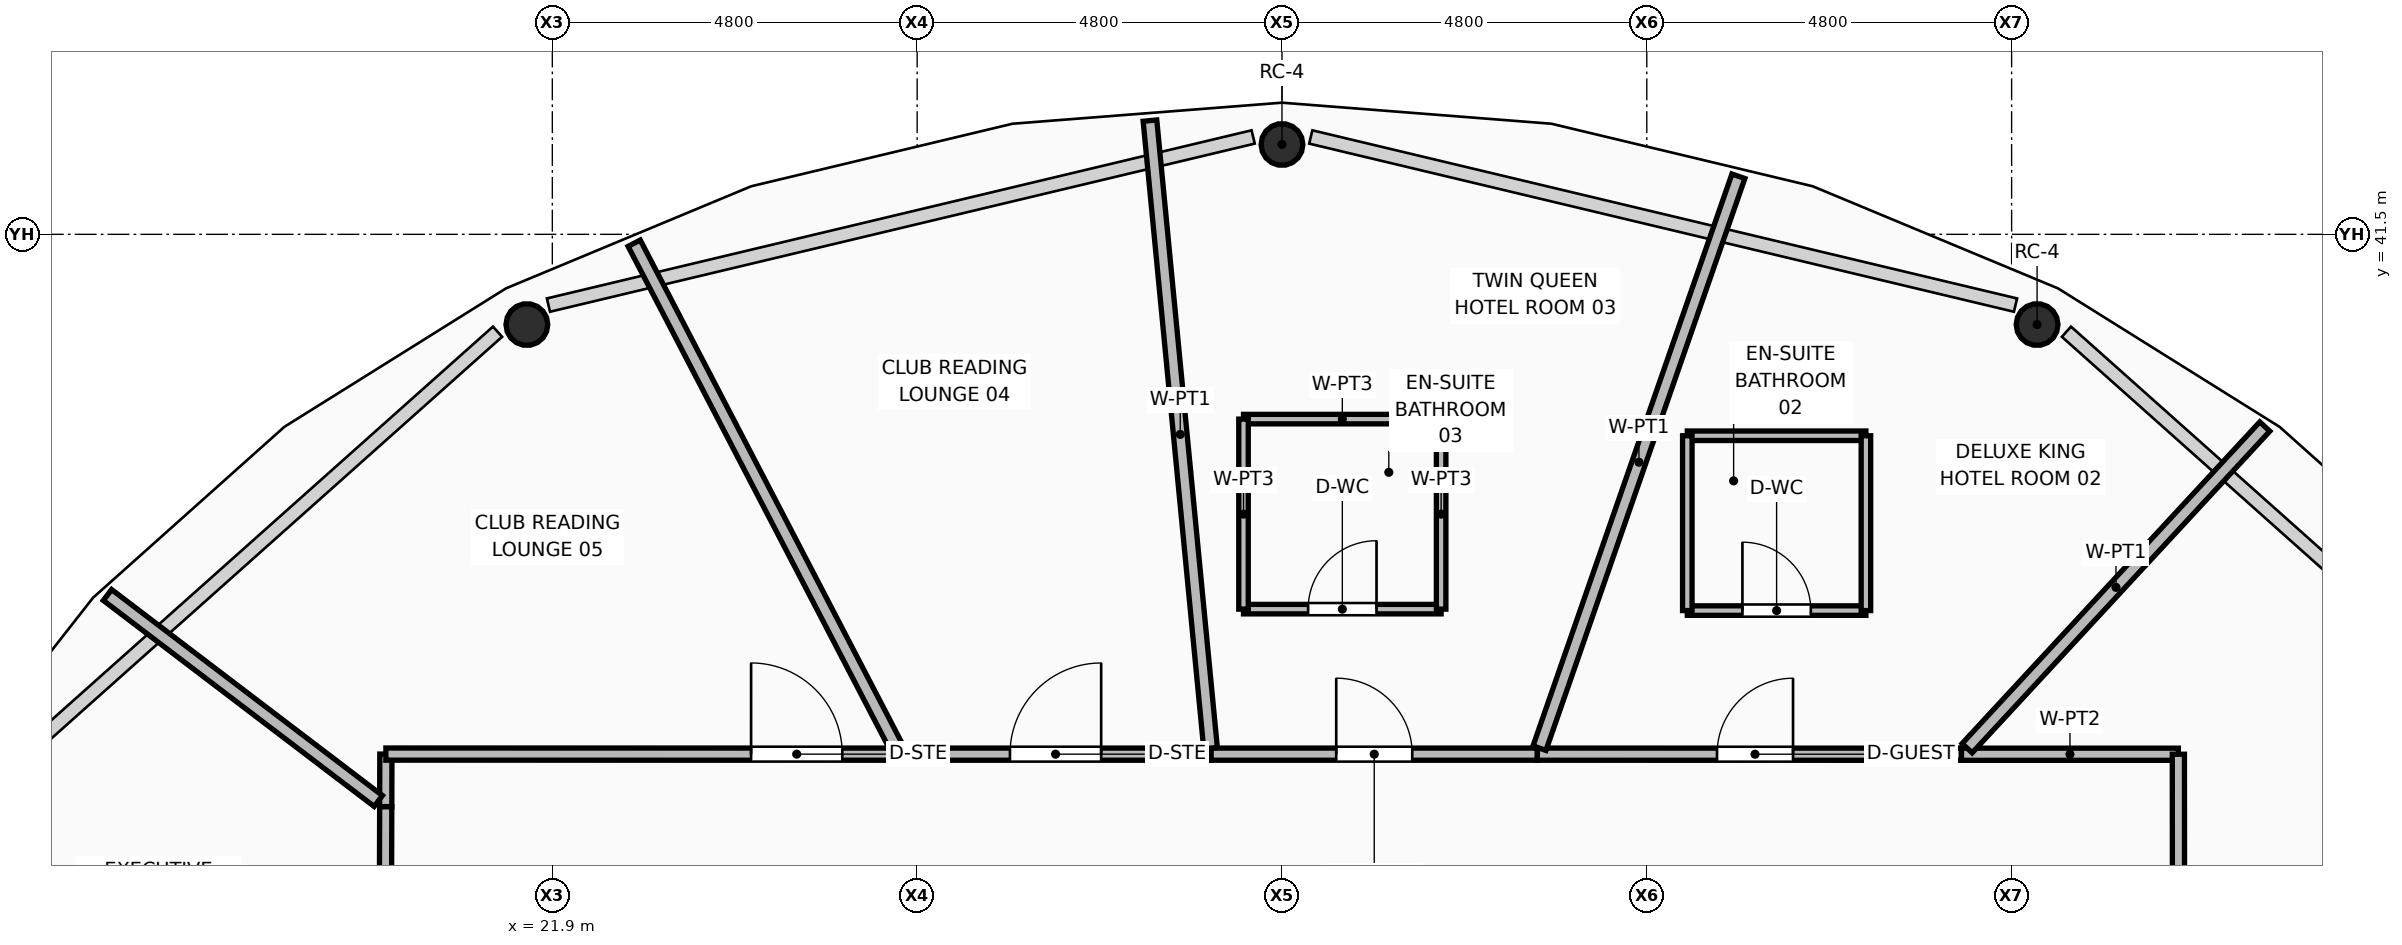
"""IFC4 building model, lengths in metres.
Left out: names, types, materials, properties, quantities, classifications, styles, units other than length and angle.
Written with IfcOpenShell. Run it as: python <this file> out.ifc"""

import sys

from ifc_helpers import new_model, si_unit, direction, frame, frame_2d, origin, origin_2d, place, context, subcontext, project, spatial, rectangle, hollow_circle, extrude, element, fill, save


model = new_model("IFC4")
c1 = context("Model", 3, precision=1e-05, world=origin(), true_north=direction((0.0, 1.0)))
c2 = subcontext(c1, "Body", "Model", "MODEL_VIEW")
j1 = project(units=[si_unit("LENGTHUNIT", "METRE"), si_unit("PLANEANGLEUNIT", "RADIAN")], contexts=[c1])
p1 = place(None, origin())
s1 = spatial("IfcSite", under=j1, at=p1, CompositionType="ELEMENT")
p2 = place(p1, origin())
s2 = spatial("IfcBuilding", under=s1, at=p2, CompositionType="ELEMENT")
p3 = place(p2, frame((0.0, 0.0, 263.85)))
s3 = spatial("IfcBuildingStorey", under=s2, at=p3, CompositionType="ELEMENT", Elevation=263.85)
for number, where, z_axis, x_axis in (
    (1, (41.435, 40.313, 0.0), (-0.011, -0.017, 1.0), (0.836, -0.549, 0.0)),
    (2, (31.5, 42.682, 0.0), (0.0, -0.02, 1.0), (1.0, 0.0, 0.0)),
):
    element("IfcColumn", number, at=place(p3, frame(where, z_axis=z_axis, x_axis=x_axis)), inside=s3, PredefinedType="COLUMN", context=c2, shape_type="SweptSolid", body=[
        extrude(hollow_circle(Radius=0.275, WallThickness=0.025, at=origin_2d()), origin(), (0.0, 0.0, 1.0), 3.571),
    ])
p4 = place(p3, frame((21.565, 40.313, 0.0), z_axis=(0.010749918117, -0.0163870703, 0.999807933149), x_axis=(0.8361437835, 0.548510321976, 0.0)))
e3 = element("IfcColumn", 3, at=p4, inside=s3, PredefinedType="COLUMN", context=c2, shape_type="SweptSolid", body=[
    extrude(hollow_circle(Radius=0.275, WallThickness=0.025, at=origin_2d()), origin(), (0.0, 0.0, 1.0), 3.725),
])
p5 = place(p3, frame((19.693, 28.843, 0.0), z_axis=(0.0, 0.0, 1.0), x_axis=(0.002904196475, 0.999995782813, 0.0)))
e4 = element("IfcWall", 4, at=p5, inside=s3, PredefinedType="PARTITIONING", context=c2, shape_type="SweptSolid", body=[
    extrude(rectangle(XDim=5.128, YDim=0.16, at=frame_2d((2.564, 0.0))), origin(), (0.0, 0.0, 1.0), 3.092),
])
p6 = place(p5, frame((0.599, 0.0, 0.0)))
e5 = element("IfcOpeningElement", 5, at=p6, cuts=e4, PredefinedType="OPENING", context=c2, shape_type="SweptSolid", body=[
    extrude(rectangle(XDim=1.0, YDim=2.1, at=frame_2d((0.5, 1.05))), frame((0.0, 0.09, 0.0), z_axis=(0.0, -1.0, 0.0), x_axis=(1.0, 0.0, 0.0)), (0.0, 0.0, 1.0), 0.18),
])
p7 = place(p3, frame((19.708, 33.971, 0.0), z_axis=(0.0, 0.0, 1.0), x_axis=(0.002825845305, 0.999996007291, 0.0)))
e6 = element("IfcWall", 6, at=p7, inside=s3, PredefinedType="PARTITIONING", context=c2, shape_type="SweptSolid", body=[
    extrude(rectangle(XDim=0.691, YDim=0.16, at=frame_2d((0.346, 0.0))), origin(), (0.0, 0.0, 1.0), 3.55),
])
p8 = place(p3, frame((19.71, 34.662, 0.0), z_axis=(0.0, 0.0, 1.0), x_axis=(0.999999983716, -0.000180466322, 0.0)))
e7 = element("IfcWall", 7, at=p8, inside=s3, PredefinedType="PARTITIONING", context=c2, shape_type="SweptSolid", body=[
    extrude(rectangle(XDim=6.764, YDim=0.16, at=frame_2d((3.382, 0.0))), origin(), (0.0, 0.0, 1.0), 3.092),
])
p9 = place(p8, frame((4.805, 0.0, 0.0)))
e8 = element("IfcOpeningElement", 8, at=p9, cuts=e7, PredefinedType="OPENING", context=c2, shape_type="SweptSolid", body=[
    extrude(rectangle(XDim=1.2, YDim=2.1, at=frame_2d((0.6, 1.05))), frame((0.0, 0.09, 0.0), z_axis=(0.0, -1.0, 0.0), x_axis=(1.0, 0.0, 0.0)), (0.0, 0.0, 1.0), 0.18),
])
p10 = place(p3, frame((26.474, 34.661, 0.0), z_axis=(0.0, 0.0, 1.0), x_axis=(1.0, 0.0, 0.0)))
e9 = element("IfcWall", 9, at=p10, inside=s3, PredefinedType="PARTITIONING", context=c2, shape_type="SweptSolid", body=[
    extrude(rectangle(XDim=4.094, YDim=0.16, at=frame_2d((2.047, 0.0))), origin(), (0.0, 0.0, 1.0), 3.55),
])
p11 = place(p10, frame((1.447, 0.0, 0.0)))
e10 = element("IfcOpeningElement", 10, at=p11, cuts=e9, PredefinedType="OPENING", context=c2, shape_type="SweptSolid", body=[
    extrude(rectangle(XDim=1.2, YDim=2.1, at=frame_2d((0.6, 1.05))), frame((0.0, 0.09, 0.0), z_axis=(0.0, -1.0, 0.0), x_axis=(1.0, 0.0, 0.0)), (0.0, 0.0, 1.0), 0.18),
])
p12 = place(p3, frame((30.568, 34.661, 0.0), z_axis=(0.0, 0.0, 1.0), x_axis=(1.0, 0.0, 0.0)))
e11 = element("IfcWall", 11, at=p12, inside=s3, PredefinedType="PARTITIONING", context=c2, shape_type="SweptSolid", body=[
    extrude(rectangle(XDim=4.292, YDim=0.16, at=frame_2d((2.146, 0.0))), origin(), (0.0, 0.0, 1.0), 3.132),
])
p13 = place(p12, frame((1.646, 0.0, 0.0)))
e12 = element("IfcOpeningElement", 12, at=p13, cuts=e11, PredefinedType="OPENING", context=c2, shape_type="SweptSolid", body=[
    extrude(rectangle(XDim=1.0, YDim=2.1, at=frame_2d((0.5, 1.05))), frame((0.0, 0.09, 0.0), z_axis=(0.0, -1.0, 0.0), x_axis=(1.0, 0.0, 0.0)), (0.0, 0.0, 1.0), 0.18),
])
p14 = place(p3, frame((34.86, 34.661, 0.0), z_axis=(0.0, 0.0, 1.0), x_axis=(0.99999998469, -0.00017498578, 0.0)))
e13 = element("IfcWall", 13, at=p14, inside=s3, PredefinedType="PARTITIONING", context=c2, shape_type="SweptSolid", body=[
    extrude(rectangle(XDim=5.581, YDim=0.16, at=frame_2d((2.791, 0.0))), origin(), (0.0, 0.0, 1.0), 3.55),
])
p15 = place(p14, frame((2.364, 0.0, 0.0)))
e14 = element("IfcOpeningElement", 14, at=p15, cuts=e13, PredefinedType="OPENING", context=c2, shape_type="SweptSolid", body=[
    extrude(rectangle(XDim=1.0, YDim=2.1, at=frame_2d((0.5, 1.05))), frame((0.0, 0.09, 0.0), z_axis=(0.0, -1.0, 0.0), x_axis=(1.0, 0.0, 0.0)), (0.0, 0.0, 1.0), 0.18),
])
p16 = place(p3, frame((40.441, 34.66, 0.0), z_axis=(0.0, 0.0, 1.0), x_axis=(1.0, 0.0, 0.0)))
e15 = element("IfcWall", 15, at=p16, inside=s3, PredefinedType="PARTITIONING", context=c2, shape_type="SweptSolid", body=[
    extrude(rectangle(XDim=2.853, YDim=0.16, at=frame_2d((1.427, 0.0))), origin(), (0.0, 0.0, 1.0), 3.132),
])
p17 = place(p3, frame((43.294, 34.66, 0.0), z_axis=(0.0, 0.0, 1.0), x_axis=(0.000699633221, -0.999999755257, 0.0)))
e16 = element("IfcWall", 16, at=p17, inside=s3, PredefinedType="PARTITIONING", context=c2, shape_type="SweptSolid", body=[
    extrude(rectangle(XDim=8.724, YDim=0.16, at=frame_2d((4.362, 0.0))), origin(), (0.0, 0.0, 1.0), 3.132),
])
p18 = place(p17, frame((4.158, 0.0, 0.0)))
e17 = element("IfcOpeningElement", 17, at=p18, cuts=e16, PredefinedType="OPENING", context=c2, shape_type="SweptSolid", body=[
    extrude(rectangle(XDim=1.0, YDim=2.1, at=frame_2d((0.5, 1.05))), frame((0.0, 0.09, 0.0), z_axis=(0.0, -1.0, 0.0), x_axis=(1.0, 0.0, 0.0)), (0.0, 0.0, 1.0), 0.18),
])
p19 = place(p3, frame((40.515, 34.74, 0.0), z_axis=(0.0, 0.0, 1.0), x_axis=(0.679264460115, 0.733893584401, 0.0)))
e18 = element("IfcWall", 18, at=p19, inside=s3, PredefinedType="PARTITIONING", context=c2, shape_type="SweptSolid", body=[
    extrude(rectangle(XDim=5.765, YDim=0.18, at=frame_2d((2.883, 0.0))), origin(), (0.0, 0.0, 1.0), 3.003),
])
p20 = place(p3, frame((34.888, 34.74, 0.0), z_axis=(0.0, 0.0, 1.0), x_axis=(0.328512304062, 0.944499690884, 0.0)))
e19 = element("IfcWall", 19, at=p20, inside=s3, PredefinedType="PARTITIONING", context=c2, shape_type="SweptSolid", body=[
    extrude(rectangle(XDim=7.966, YDim=0.18, at=frame_2d((3.983, 0.0))), origin(), (0.0, 0.0, 1.0), 3.003),
])
p21 = place(p3, frame((30.56, 34.74, 0.0), z_axis=(0.0, 0.0, 1.0), x_axis=(-0.096102192924, 0.995371472625, 0.0)))
e20 = element("IfcWall", 20, at=p21, inside=s3, PredefinedType="PARTITIONING", context=c2, shape_type="SweptSolid", body=[
    extrude(rectangle(XDim=8.294, YDim=0.18, at=frame_2d((4.147, 0.0))), origin(), (0.0, 0.0, 1.0), 2.963),
])
p22 = place(p3, frame((26.433, 34.74, 0.0), z_axis=(0.0, 0.0, 1.0), x_axis=(-0.461527239684, 0.887126037849, 0.0)))
e21 = element("IfcWall", 21, at=p22, inside=s3, PredefinedType="PARTITIONING", context=c2, shape_type="SweptSolid", body=[
    extrude(rectangle(XDim=7.488, YDim=0.18, at=frame_2d((3.744, 0.0))), origin(), (0.0, 0.0, 1.0), 2.963),
])
p23 = place(p3, frame((19.61, 34.045, 0.0), z_axis=(0.0, 0.0, 1.0), x_axis=(-0.795937236287, 0.605379150526, 0.0)))
e22 = element("IfcWall", 22, at=p23, inside=s3, PredefinedType="PARTITIONING", context=c2, shape_type="SweptSolid", body=[
    extrude(rectangle(XDim=4.477, YDim=0.18, at=frame_2d((2.238, 0.0))), origin(), (0.0, 0.0, 1.0), 2.963),
])
p24 = place(p3, frame((36.833, 36.55, 0.0), z_axis=(0.0, 0.0, 1.0), x_axis=(1.0, 0.0, 0.0)))
e23 = element("IfcWall", 23, at=p24, inside=s3, PredefinedType="PARTITIONING", context=c2, shape_type="SweptSolid", body=[
    extrude(rectangle(XDim=2.35, YDim=0.125, at=frame_2d((1.175, 0.0))), origin(), (0.0, 0.0, 1.0), 3.55),
])
p25 = place(p24, frame((0.725, 0.0, 0.0)))
e24 = element("IfcOpeningElement", 24, at=p25, cuts=e23, PredefinedType="OPENING", context=c2, shape_type="SweptSolid", body=[
    extrude(rectangle(XDim=0.9, YDim=2.1, at=frame_2d((0.45, 1.05))), frame((0.0, 0.073, 0.0), z_axis=(0.0, -1.0, 0.0), x_axis=(1.0, 0.0, 0.0)), (0.0, 0.0, 1.0), 0.145),
])
p26 = place(p3, frame((36.833, 38.85, 0.0), z_axis=(0.0, 0.0, 1.0), x_axis=(1.0, 0.0, 0.0)))
e25 = element("IfcWall", 25, at=p26, inside=s3, PredefinedType="PARTITIONING", context=c2, shape_type="SweptSolid", body=[
    extrude(rectangle(XDim=2.35, YDim=0.125, at=frame_2d((1.175, 0.0))), origin(), (0.0, 0.0, 1.0), 3.55),
])
for number, where, z_axis, x_axis in (
    (26, (36.833, 36.55, 0.0), (0.0, 0.0, 1.0), (0.0, 1.0, 0.0)),
    (27, (39.183, 36.55, 0.0), (0.0, 0.0, 1.0), (0.0, 1.0, 0.0)),
):
    element("IfcWall", number, at=place(p3, frame(where, z_axis=z_axis, x_axis=x_axis)), inside=s3, PredefinedType="PARTITIONING", context=c2, shape_type="SweptSolid", body=[
        extrude(rectangle(XDim=2.3, YDim=0.125, at=frame_2d((1.15, 0.0))), origin(), (0.0, 0.0, 1.0), 3.55),
    ])
p27 = place(p3, frame((30.994, 36.569, 0.0), z_axis=(0.0, 0.0, 1.0), x_axis=(1.0, 0.0, 0.0)))
e28 = element("IfcWall", 28, at=p27, inside=s3, PredefinedType="PARTITIONING", context=c2, shape_type="SweptSolid", body=[
    extrude(rectangle(XDim=2.6, YDim=0.125, at=frame_2d((1.3, 0.0))), origin(), (0.0, 0.0, 1.0), 3.132),
])
p28 = place(p27, frame((0.85, 0.0, 0.0)))
e29 = element("IfcOpeningElement", 29, at=p28, cuts=e28, PredefinedType="OPENING", context=c2, shape_type="SweptSolid", body=[
    extrude(rectangle(XDim=0.9, YDim=2.1, at=frame_2d((0.45, 1.05))), frame((0.0, 0.073, 0.0), z_axis=(0.0, -1.0, 0.0), x_axis=(1.0, 0.0, 0.0)), (0.0, 0.0, 1.0), 0.145),
])
p29 = place(p3, frame((30.994, 39.069, 0.0), z_axis=(0.0, 0.0, 1.0), x_axis=(1.0, 0.0, 0.0)))
e30 = element("IfcWall", 30, at=p29, inside=s3, PredefinedType="PARTITIONING", context=c2, shape_type="SweptSolid", body=[
    extrude(rectangle(XDim=2.6, YDim=0.125, at=frame_2d((1.3, 0.0))), origin(), (0.0, 0.0, 1.0), 3.132),
])
for number, where, z_axis, x_axis in (
    (31, (30.994, 36.569, 0.0), (0.0, 0.0, 1.0), (0.0, 1.0, 0.0)),
    (32, (33.594, 36.569, 0.0), (0.0, 0.0, 1.0), (0.0, 1.0, 0.0)),
):
    element("IfcWall", number, at=place(p3, frame(where, z_axis=z_axis, x_axis=x_axis)), inside=s3, PredefinedType="PARTITIONING", context=c2, shape_type="SweptSolid", body=[
        extrude(rectangle(XDim=2.5, YDim=0.125, at=frame_2d((1.25, 0.0))), origin(), (0.0, 0.0, 1.0), 3.55),
    ])
p30 = place(p25, origin())
e33 = element("IfcDoor", 33, at=p30, inside=s3, OperationType="SINGLE_SWING_LEFT", PredefinedType="DOOR", context=c2, shape_type="SweptSolid", body=[
    extrude(rectangle(XDim=0.9, YDim=2.1, at=frame_2d((0.45, 1.05))), frame((0.0, 0.025, 0.0), z_axis=(0.0, -1.0, 0.0), x_axis=(1.0, 0.0, 0.0)), (0.0, 0.0, 1.0), 0.05),
])
fill(e24, e33)
p31 = place(p15, origin())
e34 = element("IfcDoor", 34, at=p31, inside=s3, OperationType="SINGLE_SWING_RIGHT", PredefinedType="DOOR", context=c2, shape_type="SweptSolid", body=[
    extrude(rectangle(XDim=1.0, YDim=2.1, at=frame_2d((0.5, 1.05))), frame((0.0, 0.025, 0.0), z_axis=(0.0, -1.0, 0.0), x_axis=(1.0, 0.0, 0.0)), (0.0, 0.0, 1.0), 0.05),
])
fill(e14, e34)
p32 = place(p28, origin())
e35 = element("IfcDoor", 35, at=p32, inside=s3, OperationType="SINGLE_SWING_RIGHT", PredefinedType="DOOR", context=c2, shape_type="SweptSolid", body=[
    extrude(rectangle(XDim=0.9, YDim=2.1, at=frame_2d((0.45, 1.05))), frame((0.0, 0.025, 0.0), z_axis=(0.0, -1.0, 0.0), x_axis=(1.0, 0.0, 0.0)), (0.0, 0.0, 1.0), 0.05),
])
fill(e29, e35)
p33 = place(p13, origin())
e36 = element("IfcDoor", 36, at=p33, inside=s3, OperationType="SINGLE_SWING_LEFT", PredefinedType="DOOR", context=c2, shape_type="SweptSolid", body=[
    extrude(rectangle(XDim=1.0, YDim=2.1, at=frame_2d((0.5, 1.05))), frame((0.0, 0.025, 0.0), z_axis=(0.0, -1.0, 0.0), x_axis=(1.0, 0.0, 0.0)), (0.0, 0.0, 1.0), 0.05),
])
fill(e12, e36)
p34 = place(p11, origin())
e37 = element("IfcDoor", 37, at=p34, inside=s3, OperationType="SINGLE_SWING_RIGHT", PredefinedType="DOOR", context=c2, shape_type="SweptSolid", body=[
    extrude(rectangle(XDim=1.2, YDim=2.1, at=frame_2d((0.6, 1.05))), frame((0.0, 0.025, 0.0), z_axis=(0.0, -1.0, 0.0), x_axis=(1.0, 0.0, 0.0)), (0.0, 0.0, 1.0), 0.05),
])
fill(e10, e37)
p35 = place(p9, origin())
e38 = element("IfcDoor", 38, at=p35, inside=s3, OperationType="SINGLE_SWING_LEFT", PredefinedType="DOOR", context=c2, shape_type="SweptSolid", body=[
    extrude(rectangle(XDim=1.2, YDim=2.1, at=frame_2d((0.6, 1.05))), frame((0.0, 0.025, 0.0), z_axis=(0.0, -1.0, 0.0), x_axis=(1.0, 0.0, 0.0)), (0.0, 0.0, 1.0), 0.05),
])
fill(e8, e38)
save(model, sys.argv[1])
